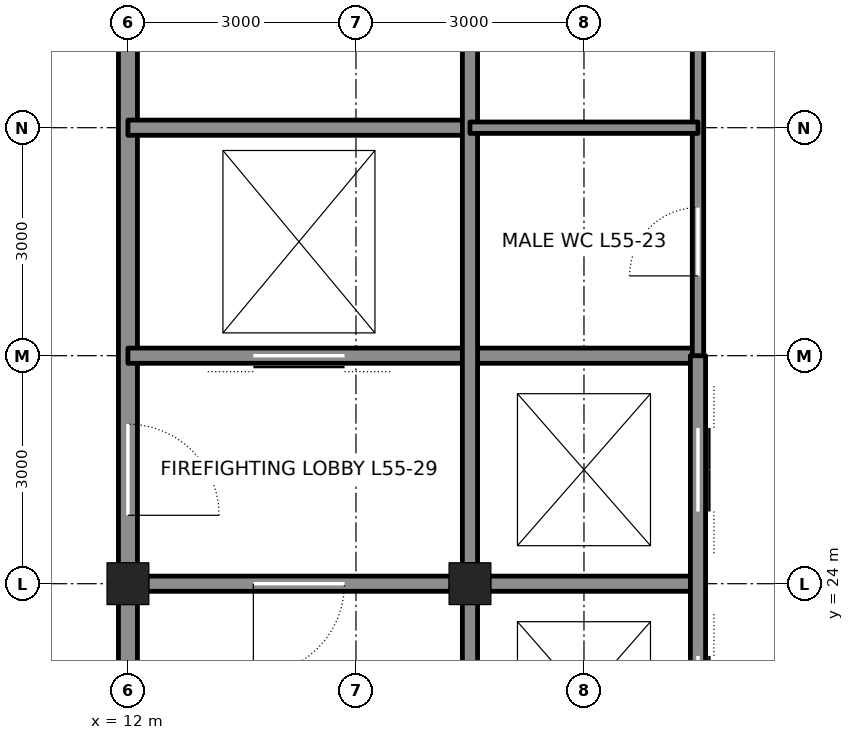
"""IFC4 building model, lengths in metres.
Left out: names, types, materials, properties, quantities, classifications, styles, units other than length and angle.
Written with IfcOpenShell. Run it as: python <this file> out.ifc"""

import sys

from ifc_helpers import new_model, si_unit, direction, frame, frame_2d, origin, origin_2d, place, context, subcontext, project, spatial, rectangle, hollow_rectangle, extrude, element, fill, save


model = new_model("IFC4")
c1 = context("Model", 3, precision=1e-05, world=origin(), true_north=direction((0.0, 1.0)))
c2 = subcontext(c1, "Body", "Model", "MODEL_VIEW")
j1 = project(units=[si_unit("LENGTHUNIT", "METRE"), si_unit("PLANEANGLEUNIT", "RADIAN")], contexts=[c1])
p1 = place(None, origin())
s1 = spatial("IfcSite", under=j1, at=p1, CompositionType="ELEMENT")
p2 = place(p1, origin())
s2 = spatial("IfcBuilding", under=s1, at=p2, CompositionType="ELEMENT")
p3 = place(p2, frame((0.0, 0.0, 247.5)))
s3 = spatial("IfcBuildingStorey", under=s2, at=p3, CompositionType="ELEMENT", Elevation=247.5)
for number, where, z_axis, x_axis in (
    (1, (12.0, 24.0, 0.0), (0.0, 0.0, 1.0), (1.0, 0.0, 0.0)),
    (2, (16.5, 24.0, 0.0), (0.0, 0.0, 1.0), (1.0, 0.0, 0.0)),
):
    element("IfcColumn", number, at=place(p3, frame(where, z_axis=z_axis, x_axis=x_axis)), inside=s3, PredefinedType="COLUMN", context=c2, shape_type="SweptSolid", body=[
        extrude(hollow_rectangle(XDim=0.55, YDim=0.55, WallThickness=0.045, at=origin_2d()), origin(), (0.0, 0.0, 1.0), 4.2),
    ])
p4 = place(p3, frame((12.0, 21.25, 0.0), z_axis=(0.0, 0.0, 1.0), x_axis=(0.0, 1.0, 0.0)))
e3 = element("IfcWall", 3, at=p4, inside=s3, PredefinedType="SOLIDWALL", context=c2, shape_type="SweptSolid", body=[
    extrude(rectangle(XDim=2.5, YDim=0.25, at=frame_2d((1.25, 0.0))), origin(), (0.0, 0.0, 1.0), 3.113),
])
p5 = place(p3, frame((12.0, 24.25, 0.0), z_axis=(0.0, 0.0, 1.0), x_axis=(0.0, 1.0, 0.0)))
e4 = element("IfcWall", 4, at=p5, inside=s3, PredefinedType="SOLIDWALL", context=c2, shape_type="SweptSolid", body=[
    extrude(rectangle(XDim=8.5, YDim=0.25, at=frame_2d((4.25, 0.0))), origin(), (0.0, 0.0, 1.0), 3.113),
])
p6 = place(p5, frame((0.65, 0.0, 0.0)))
e5 = element("IfcOpeningElement", 5, at=p6, cuts=e4, PredefinedType="OPENING", context=c2, shape_type="SweptSolid", body=[
    extrude(rectangle(XDim=1.2, YDim=2.1, at=frame_2d((0.6, 1.05))), frame((0.0, 0.135, 0.0), z_axis=(0.0, -1.0, 0.0), x_axis=(1.0, 0.0, 0.0)), (0.0, 0.0, 1.0), 0.27),
])
p7 = place(p5, frame((6.875, 0.0, 0.0)))
e6 = element("IfcOpeningElement", 6, at=p7, cuts=e4, PredefinedType="OPENING", context=c2, shape_type="SweptSolid", body=[
    extrude(rectangle(XDim=0.75, YDim=2.1, at=frame_2d((0.375, 1.05))), frame((0.0, 0.135, 0.0), z_axis=(0.0, -1.0, 0.0), x_axis=(1.0, 0.0, 0.0)), (0.0, 0.0, 1.0), 0.27),
])
p8 = place(p3, frame((12.25, 24.0, 0.0), z_axis=(0.0, 0.0, 1.0), x_axis=(1.0, 0.0, 0.0)))
e7 = element("IfcWall", 7, at=p8, inside=s3, PredefinedType="SOLIDWALL", context=c2, shape_type="SweptSolid", body=[
    extrude(rectangle(XDim=4.0, YDim=0.2, at=frame_2d((2.0, 0.0))), origin(), (0.0, 0.0, 1.0), 3.09),
])
p9 = place(p8, frame((1.4, 0.0, 0.0)))
e8 = element("IfcOpeningElement", 8, at=p9, cuts=e7, PredefinedType="OPENING", context=c2, shape_type="SweptSolid", body=[
    extrude(rectangle(XDim=1.2, YDim=2.1, at=frame_2d((0.6, 1.05))), frame((0.0, 0.11, 0.0), z_axis=(0.0, -1.0, 0.0), x_axis=(1.0, 0.0, 0.0)), (0.0, 0.0, 1.0), 0.22),
])
p10 = place(p3, frame((16.75, 24.0, 0.0), z_axis=(0.0, 0.0, 1.0), x_axis=(1.0, 0.0, 0.0)))
e9 = element("IfcWall", 9, at=p10, inside=s3, PredefinedType="SOLIDWALL", context=c2, shape_type="SweptSolid", body=[
    extrude(rectangle(XDim=2.75, YDim=0.2, at=frame_2d((1.375, 0.0))), origin(), (0.0, 0.0, 1.0), 3.09),
])
p11 = place(p3, frame((12.0, 27.0, 0.0), z_axis=(0.0, 0.0, 1.0), x_axis=(1.0, 0.0, 0.0)))
e10 = element("IfcWall", 10, at=p11, inside=s3, PredefinedType="SOLIDWALL", context=c2, shape_type="SweptSolid", body=[
    extrude(rectangle(XDim=7.5, YDim=0.2, at=frame_2d((3.75, 0.0))), origin(), (0.0, 0.0, 1.0), 4.04),
])
p12 = place(p11, frame((1.65, 0.0, 0.0)))
e11 = element("IfcOpeningElement", 11, at=p12, cuts=e10, PredefinedType="OPENING", context=c2, shape_type="SweptSolid", body=[
    extrude(rectangle(XDim=1.2, YDim=2.1, at=frame_2d((0.6, 1.05))), frame((0.0, 0.11, 0.0), z_axis=(0.0, -1.0, 0.0), x_axis=(1.0, 0.0, 0.0)), (0.0, 0.0, 1.0), 0.22),
])
p13 = place(p3, frame((12.0, 30.0, 0.0), z_axis=(0.0, 0.0, 1.0), x_axis=(1.0, 0.0, 0.0)))
e12 = element("IfcWall", 12, at=p13, inside=s3, PredefinedType="SOLIDWALL", context=c2, shape_type="SweptSolid", body=[
    extrude(rectangle(XDim=4.5, YDim=0.2, at=frame_2d((2.25, 0.0))), origin(), (0.0, 0.0, 1.0), 4.04),
])
p14 = place(p3, frame((16.5, 21.25, 0.0), z_axis=(0.0, 0.0, 1.0), x_axis=(0.0, 1.0, 0.0)))
e13 = element("IfcWall", 13, at=p14, inside=s3, PredefinedType="SOLIDWALL", context=c2, shape_type="SweptSolid", body=[
    extrude(rectangle(XDim=2.5, YDim=0.2, at=frame_2d((1.25, 0.0))), origin(), (0.0, 0.0, 1.0), 3.113),
])
p15 = place(p3, frame((16.5, 24.25, 0.0), z_axis=(0.0, 0.0, 1.0), x_axis=(0.0, 1.0, 0.0)))
e14 = element("IfcWall", 14, at=p15, inside=s3, PredefinedType="SOLIDWALL", context=c2, shape_type="SweptSolid", body=[
    extrude(rectangle(XDim=8.5, YDim=0.2, at=frame_2d((4.25, 0.0))), origin(), (0.0, 0.0, 1.0), 3.113),
])
p16 = place(p3, frame((19.5, 15.0, 0.0), z_axis=(0.0, 0.0, 1.0), x_axis=(0.0, 1.0, 0.0)))
e15 = element("IfcWall", 15, at=p16, inside=s3, PredefinedType="SOLIDWALL", context=c2, shape_type="SweptSolid", body=[
    extrude(rectangle(XDim=12.0, YDim=0.2, at=frame_2d((6.0, 0.0))), origin(), (0.0, 0.0, 1.0), 3.065),
])
p17 = place(p16, frame((0.95, 0.0, 0.0)))
e16 = element("IfcOpeningElement", 16, at=p17, cuts=e15, PredefinedType="OPENING", context=c2, shape_type="SweptSolid", body=[
    extrude(rectangle(XDim=1.1, YDim=2.1, at=frame_2d((0.55, 1.05))), frame((0.0, 0.11, 0.0), z_axis=(0.0, -1.0, 0.0), x_axis=(1.0, 0.0, 0.0)), (0.0, 0.0, 1.0), 0.22),
])
p18 = place(p16, frame((3.95, 0.0, 0.0)))
e17 = element("IfcOpeningElement", 17, at=p18, cuts=e15, PredefinedType="OPENING", context=c2, shape_type="SweptSolid", body=[
    extrude(rectangle(XDim=1.1, YDim=2.1, at=frame_2d((0.55, 1.05))), frame((0.0, 0.11, 0.0), z_axis=(0.0, -1.0, 0.0), x_axis=(1.0, 0.0, 0.0)), (0.0, 0.0, 1.0), 0.22),
])
p19 = place(p16, frame((6.95, 0.0, 0.0)))
e18 = element("IfcOpeningElement", 18, at=p19, cuts=e15, PredefinedType="OPENING", context=c2, shape_type="SweptSolid", body=[
    extrude(rectangle(XDim=1.1, YDim=2.1, at=frame_2d((0.55, 1.05))), frame((0.0, 0.11, 0.0), z_axis=(0.0, -1.0, 0.0), x_axis=(1.0, 0.0, 0.0)), (0.0, 0.0, 1.0), 0.22),
])
p20 = place(p16, frame((9.95, 0.0, 0.0)))
e19 = element("IfcOpeningElement", 19, at=p20, cuts=e15, PredefinedType="OPENING", context=c2, shape_type="SweptSolid", body=[
    extrude(rectangle(XDim=1.1, YDim=2.1, at=frame_2d((0.55, 1.05))), frame((0.0, 0.11, 0.0), z_axis=(0.0, -1.0, 0.0), x_axis=(1.0, 0.0, 0.0)), (0.0, 0.0, 1.0), 0.22),
])
p21 = place(p3, frame((19.5, 27.0, 0.0), z_axis=(0.0, 0.0, 1.0), x_axis=(0.0, 1.0, 0.0)))
e20 = element("IfcWall", 20, at=p21, inside=s3, PredefinedType="PARTITIONING", context=c2, shape_type="SweptSolid", body=[
    extrude(rectangle(XDim=5.75, YDim=0.15, at=frame_2d((2.875, 0.0))), origin(), (0.0, 0.0, 1.0), 3.065),
])
p22 = place(p21, frame((1.05, 0.0, 0.0)))
e21 = element("IfcOpeningElement", 21, at=p22, cuts=e20, PredefinedType="OPENING", context=c2, shape_type="SweptSolid", body=[
    extrude(rectangle(XDim=0.9, YDim=2.1, at=frame_2d((0.45, 1.05))), frame((0.0, 0.085, 0.0), z_axis=(0.0, -1.0, 0.0), x_axis=(1.0, 0.0, 0.0)), (0.0, 0.0, 1.0), 0.17),
])
p23 = place(p21, frame((4.05, 0.0, 0.0)))
e22 = element("IfcOpeningElement", 22, at=p23, cuts=e20, PredefinedType="OPENING", context=c2, shape_type="SweptSolid", body=[
    extrude(rectangle(XDim=0.9, YDim=2.1, at=frame_2d((0.45, 1.05))), frame((0.0, 0.085, 0.0), z_axis=(0.0, -1.0, 0.0), x_axis=(1.0, 0.0, 0.0)), (0.0, 0.0, 1.0), 0.17),
])
p24 = place(p3, frame((16.5, 30.0, 0.0), z_axis=(0.0, 0.0, 1.0), x_axis=(1.0, 0.0, 0.0)))
e23 = element("IfcWall", 23, at=p24, inside=s3, PredefinedType="PARTITIONING", context=c2, shape_type="SweptSolid", body=[
    extrude(rectangle(XDim=3.0, YDim=0.15, at=frame_2d((1.5, 0.0))), origin(), (0.0, 0.0, 1.0), 4.04),
])
p25 = place(p9, frame((1.2, 0.0, 0.0), z_axis=(0.0, 0.0, 1.0), x_axis=(-1.0, 0.0, 0.0)))
e24 = element("IfcDoor", 24, at=p25, inside=s3, OperationType="SINGLE_SWING_RIGHT", PredefinedType="DOOR", context=c2, shape_type="SweptSolid", body=[
    extrude(rectangle(XDim=1.2, YDim=2.1, at=frame_2d((0.6, 1.05))), frame((0.0, 0.025, 0.0), z_axis=(0.0, -1.0, 0.0), x_axis=(1.0, 0.0, 0.0)), (0.0, 0.0, 1.0), 0.05),
])
fill(e8, e24)
p26 = place(p6, frame((1.2, 0.0, 0.0), z_axis=(0.0, 0.0, 1.0), x_axis=(-1.0, 0.0, 0.0)))
e25 = element("IfcDoor", 25, at=p26, inside=s3, OperationType="SINGLE_SWING_RIGHT", PredefinedType="DOOR", context=c2, shape_type="SweptSolid", body=[
    extrude(rectangle(XDim=1.2, YDim=2.1, at=frame_2d((0.6, 1.05))), frame((0.0, 0.025, 0.0), z_axis=(0.0, -1.0, 0.0), x_axis=(1.0, 0.0, 0.0)), (0.0, 0.0, 1.0), 0.05),
])
fill(e5, e25)
p27 = place(p12, origin())
e26 = element("IfcDoor", 26, at=p27, inside=s3, OperationType="DOUBLE_DOOR_SLIDING", PredefinedType="DOOR", context=c2, shape_type="SweptSolid", body=[
    extrude(rectangle(XDim=1.2, YDim=2.1, at=frame_2d((0.6, 1.05))), frame((0.0, 0.025, 0.0), z_axis=(0.0, -1.0, 0.0), x_axis=(1.0, 0.0, 0.0)), (0.0, 0.0, 1.0), 0.05),
])
fill(e11, e26)
p28 = place(p22, origin())
e27 = element("IfcDoor", 27, at=p28, inside=s3, OperationType="SINGLE_SWING_LEFT", PredefinedType="DOOR", context=c2, shape_type="SweptSolid", body=[
    extrude(rectangle(XDim=0.9, YDim=2.1, at=frame_2d((0.45, 1.05))), frame((0.0, 0.025, 0.0), z_axis=(0.0, -1.0, 0.0), x_axis=(1.0, 0.0, 0.0)), (0.0, 0.0, 1.0), 0.05),
])
fill(e21, e27)
p29 = place(p19, origin())
e28 = element("IfcDoor", 28, at=p29, inside=s3, OperationType="DOUBLE_DOOR_SLIDING", PredefinedType="DOOR", context=c2, shape_type="SweptSolid", body=[
    extrude(rectangle(XDim=1.1, YDim=2.1, at=frame_2d((0.55, 1.05))), frame((0.0, 0.025, 0.0), z_axis=(0.0, -1.0, 0.0), x_axis=(1.0, 0.0, 0.0)), (0.0, 0.0, 1.0), 0.05),
])
fill(e18, e28)
p30 = place(p20, origin())
e29 = element("IfcDoor", 29, at=p30, inside=s3, OperationType="DOUBLE_DOOR_SLIDING", PredefinedType="DOOR", context=c2, shape_type="SweptSolid", body=[
    extrude(rectangle(XDim=1.1, YDim=2.1, at=frame_2d((0.55, 1.05))), frame((0.0, 0.025, 0.0), z_axis=(0.0, -1.0, 0.0), x_axis=(1.0, 0.0, 0.0)), (0.0, 0.0, 1.0), 0.05),
])
fill(e19, e29)
save(model, sys.argv[1])
